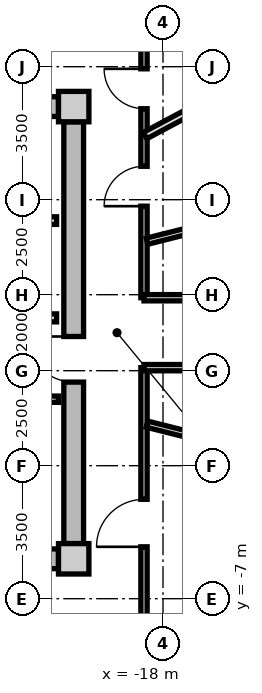
"""IFC4 building model, lengths in metres.
Left out: names, types, materials, properties, quantities, classifications, styles, units other than length and angle.
Written with IfcOpenShell. Run it as: python <this file> out.ifc"""

import sys

from ifc_helpers import new_model, si_unit, direction, frame, frame_2d, origin, origin_2d, place, context, subcontext, project, spatial, rectangle, extrude, source, transform, mapped, element, fill, save


model = new_model("IFC4")
c1 = context("Model", 3, precision=1e-05, world=origin(), true_north=direction((0.0, 1.0)))
c2 = subcontext(c1, "Body", "Model", "MODEL_VIEW")
j1 = project(units=[si_unit("LENGTHUNIT", "METRE"), si_unit("PLANEANGLEUNIT", "RADIAN")], contexts=[c1])
p1 = place(None, origin())
s1 = spatial("IfcSite", under=j1, at=p1, CompositionType="ELEMENT")
p2 = place(p1, origin())
s2 = spatial("IfcBuilding", under=s1, at=p2, CompositionType="ELEMENT")
p3 = place(p2, frame((0.0, 0.0, 220.0)))
s3 = spatial("IfcBuildingStorey", under=s2, at=p3, CompositionType="ELEMENT", Elevation=220.0)
m1 = source(origin(), c2, "Body", "SweptSolid", [
    extrude(rectangle(XDim=0.8, YDim=0.8, at=origin_2d()), origin(), (0.0, 0.0, 1.0), 3.05),
])
for number, where, z_axis, x_axis in (
    (1, (-20.35, -5.95, 0.0), (0.0, 0.0, 1.0), (1.0, 0.0, 0.0)),
    (2, (-20.35, 5.95, 0.0), (0.0, 0.0, 1.0), (1.0, 0.0, 0.0)),
):
    element("IfcColumn", number, at=place(p3, frame(where, z_axis=z_axis, x_axis=x_axis)), inside=s3, PredefinedType="COLUMN", context=c2, shape_type="MappedRepresentation", body=[
        mapped(m1, transform((0.0, 0.0, 0.0), x_axis=(1.0, 0.0, 0.0), y_axis=(0.0, 1.0, 0.0), z_axis=(0.0, 0.0, 1.0), scale=1.0)),
    ])
m2 = source(origin(), c2, "Body", "SweptSolid", [
    extrude(rectangle(XDim=14.5, YDim=0.52, at=frame_2d((7.25, 0.0))), origin(), (0.0, 0.0, 1.0), 2.76),
])
for number, where, z_axis, x_axis in (
    (3, (-35.25, 5.95, 0.0), (0.0, 0.0, 1.0), (1.0, 0.0, 0.0)),
    (4, (-20.75, -5.95, 0.0), (0.0, 0.0, 1.0), (-1.0, 0.0, 0.0)),
):
    element("IfcWall", number, at=place(p3, frame(where, z_axis=z_axis, x_axis=x_axis)), inside=s3, PredefinedType="SHEAR", context=c2, shape_type="MappedRepresentation", body=[
        mapped(m2, transform((0.0, 0.0, 0.0), x_axis=(1.0, 0.0, 0.0), y_axis=(0.0, 1.0, 0.0), z_axis=(0.0, 0.0, 1.0), scale=1.0)),
    ])
m3 = source(origin(), c2, "Body", "SweptSolid", [
    extrude(rectangle(XDim=11.1, YDim=0.52, at=frame_2d((5.55, 0.0))), origin(), (0.0, 0.0, 1.0), 2.76),
])
p4 = place(p3, frame((-20.35, 5.55, 0.0), z_axis=(0.0, 0.0, 1.0), x_axis=(0.0, -1.0, 0.0)))
e5 = element("IfcWall", 5, at=p4, inside=s3, PredefinedType="SHEAR", context=c2, shape_type="MappedRepresentation", body=[
    mapped(m3, transform((0.0, 0.0, 0.0), x_axis=(1.0, 0.0, 0.0), y_axis=(0.0, 1.0, 0.0), z_axis=(0.0, 0.0, 1.0), scale=1.0)),
])
p5 = place(p4, frame((5.65, 0.0, 0.0)))
e6 = element("IfcOpeningElement", 6, at=p5, cuts=e5, PredefinedType="OPENING", context=c2, shape_type="SweptSolid", body=[
    extrude(rectangle(XDim=1.2, YDim=2.15, at=frame_2d((0.6, 1.075))), frame((0.0, 0.27, 0.0), z_axis=(0.0, -1.0, 0.0), x_axis=(1.0, 0.0, 0.0)), (0.0, 0.0, 1.0), 0.54),
])
m4 = source(origin(), c2, "Body", "SweptSolid", [
    extrude(rectangle(XDim=3.2, YDim=0.2, at=frame_2d((1.6, 0.0))), origin(), (0.0, 0.0, 1.0), 2.745),
])
p6 = place(p3, frame((-24.0, 2.95, 0.0), z_axis=(0.0, 0.0, 1.0), x_axis=(1.0, 0.0, 0.0)))
e7 = element("IfcWall", 7, at=p6, inside=s3, PredefinedType="PARTITIONING", context=c2, shape_type="MappedRepresentation", body=[
    mapped(m4, transform((0.0, 0.0, 0.0), x_axis=(1.0, 0.0, 0.0), y_axis=(0.0, 1.0, 0.0), z_axis=(0.0, 0.0, 1.0), scale=1.0)),
])
m5 = source(origin(), c2, "Body", "SweptSolid", [
    extrude(rectangle(XDim=6.66, YDim=0.21, at=frame_2d((3.33, 0.0))), origin(), (0.0, 0.0, 1.0), 2.745),
])
p7 = place(p3, frame((-27.46, 0.39, 0.0), z_axis=(0.0, 0.0, 1.0), x_axis=(1.0, 0.0, 0.0)))
e8 = element("IfcWall", 8, at=p7, inside=s3, PredefinedType="PARTITIONING", context=c2, shape_type="MappedRepresentation", body=[
    mapped(m5, transform((0.0, 0.0, 0.0), x_axis=(1.0, 0.0, 0.0), y_axis=(0.0, 1.0, 0.0), z_axis=(0.0, 0.0, 1.0), scale=1.0)),
])
p8 = place(p7, frame((1.0, 0.0, 0.0)))
e9 = element("IfcOpeningElement", 9, at=p8, cuts=e8, PredefinedType="OPENING", context=c2, shape_type="SweptSolid", body=[
    extrude(rectangle(XDim=1.2, YDim=2.15, at=frame_2d((0.6, 1.075))), frame((0.0, 0.115, 0.0), z_axis=(0.0, -1.0, 0.0), x_axis=(1.0, 0.0, 0.0)), (0.0, 0.0, 1.0), 0.23),
])
m6 = source(origin(), c2, "Body", "SweptSolid", [
    extrude(rectangle(XDim=2.7, YDim=0.165, at=frame_2d((1.35, 0.0))), origin(), (0.0, 0.0, 1.0), 2.745),
])
p9 = place(p3, frame((-23.45, -1.75, 0.0), z_axis=(0.0, 0.0, 1.0), x_axis=(1.0, 0.0, 0.0)))
e10 = element("IfcWall", 10, at=p9, inside=s3, PredefinedType="PARTITIONING", context=c2, shape_type="MappedRepresentation", body=[
    mapped(m6, transform((0.0, 0.0, 0.0), x_axis=(1.0, 0.0, 0.0), y_axis=(0.0, 1.0, 0.0), z_axis=(0.0, 0.0, 1.0), scale=1.0)),
])
p10 = place(p9, frame((0.222, 0.0, 0.0)))
e11 = element("IfcOpeningElement", 11, at=p10, cuts=e10, PredefinedType="OPENING", context=c2, shape_type="SweptSolid", body=[
    extrude(rectangle(XDim=0.925, YDim=2.1, at=frame_2d((0.462, 1.05))), frame((0.0, 0.093, 0.0), z_axis=(0.0, -1.0, 0.0), x_axis=(1.0, 0.0, 0.0)), (0.0, 0.0, 1.0), 0.185),
])
p11 = place(p9, frame((1.522, 0.0, 0.0)))
e12 = element("IfcOpeningElement", 12, at=p11, cuts=e10, PredefinedType="OPENING", context=c2, shape_type="SweptSolid", body=[
    extrude(rectangle(XDim=0.925, YDim=2.1, at=frame_2d((0.462, 1.05))), frame((0.0, 0.093, 0.0), z_axis=(0.0, -1.0, 0.0), x_axis=(1.0, 0.0, 0.0)), (0.0, 0.0, 1.0), 0.185),
])
m7 = source(origin(), c2, "Body", "SweptSolid", [
    extrude(rectangle(XDim=6.88, YDim=0.165, at=frame_2d((3.44, 0.0))), origin(), (0.0, 0.0, 1.0), 2.745),
])
p12 = place(p3, frame((-18.5, 7.8, 0.0), z_axis=(0.0, 0.0, 1.0), x_axis=(0.0, -1.0, 0.0)))
e13 = element("IfcWall", 13, at=p12, inside=s3, PredefinedType="PARTITIONING", context=c2, shape_type="MappedRepresentation", body=[
    mapped(m7, transform((0.0, 0.0, 0.0), x_axis=(1.0, 0.0, 0.0), y_axis=(0.0, 1.0, 0.0), z_axis=(0.0, 0.0, 1.0), scale=1.0)),
])
p13 = place(p12, frame((3.421, 0.0, 0.0)))
e14 = element("IfcOpeningElement", 14, at=p13, cuts=e13, PredefinedType="OPENING", context=c2, shape_type="SweptSolid", body=[
    extrude(rectangle(XDim=1.05, YDim=2.15, at=frame_2d((0.525, 1.075))), frame((0.0, 0.093, 0.0), z_axis=(0.0, -1.0, 0.0), x_axis=(1.0, 0.0, 0.0)), (0.0, 0.0, 1.0), 0.185),
])
p14 = place(p12, frame((0.856, 0.0, 0.0)))
e15 = element("IfcOpeningElement", 15, at=p14, cuts=e13, PredefinedType="OPENING", context=c2, shape_type="SweptSolid", body=[
    extrude(rectangle(XDim=1.05, YDim=2.15, at=frame_2d((0.525, 1.075))), frame((0.0, 0.093, 0.0), z_axis=(0.0, -1.0, 0.0), x_axis=(1.0, 0.0, 0.0)), (0.0, 0.0, 1.0), 0.185),
])
p15 = place(p3, frame((-18.5, -0.92, 0.0), z_axis=(0.0, 0.0, 1.0), x_axis=(0.0, -1.0, 0.0)))
e16 = element("IfcWall", 16, at=p15, inside=s3, PredefinedType="PARTITIONING", context=c2, shape_type="MappedRepresentation", body=[
    mapped(m7, transform((0.0, 0.0, 0.0), x_axis=(1.0, 0.0, 0.0), y_axis=(0.0, 1.0, 0.0), z_axis=(0.0, 0.0, 1.0), scale=1.0)),
])
p16 = place(p15, frame((3.464, 0.0, 0.0)))
e17 = element("IfcOpeningElement", 17, at=p16, cuts=e16, PredefinedType="OPENING", context=c2, shape_type="SweptSolid", body=[
    extrude(rectangle(XDim=1.25, YDim=2.2, at=frame_2d((0.625, 1.1))), frame((0.0, 0.093, 0.0), z_axis=(0.0, -1.0, 0.0), x_axis=(1.0, 0.0, 0.0)), (0.0, 0.0, 1.0), 0.185),
])
m8 = source(origin(), c2, "Body", "SweptSolid", [
    extrude(rectangle(XDim=6.157, YDim=0.165, at=frame_2d((3.079, 0.0))), origin(), (0.0, 0.0, 1.0), 2.345),
])
for number, where, z_axis, x_axis in (
    (18, (-18.42, -2.407, 0.0), (0.0, 0.0, 1.0), (0.97, -0.244, 0.0)),
    (19, (-18.42, 2.407, 0.0), (0.0, 0.0, 1.0), (0.97, 0.244, 0.0)),
):
    element("IfcWall", number, at=place(p3, frame(where, z_axis=z_axis, x_axis=x_axis)), inside=s3, PredefinedType="PARTITIONING", context=c2, shape_type="MappedRepresentation", body=[
        mapped(m8, transform((0.0, 0.0, 0.0), x_axis=(1.0, 0.0, 0.0), y_axis=(0.0, 1.0, 0.0), z_axis=(0.0, 0.0, 1.0), scale=1.0)),
    ])
m9 = source(origin(), c2, "Body", "SweptSolid", [
    extrude(rectangle(XDim=4.465, YDim=0.19, at=frame_2d((2.232, 0.0))), origin(), (0.0, 0.0, 1.0), 2.745),
])
p17 = place(p3, frame((-18.47, 5.188, 0.0), z_axis=(0.0, 0.0, 1.0), x_axis=(0.881981829834, 0.471283409259, 0.0)))
e20 = element("IfcWall", 20, at=p17, inside=s3, PredefinedType="PARTITIONING", context=c2, shape_type="MappedRepresentation", body=[
    mapped(m9, transform((0.0, 0.0, 0.0), x_axis=(1.0, 0.0, 0.0), y_axis=(0.0, 1.0, 0.0), z_axis=(0.0, 0.0, 1.0), scale=1.0)),
])
m10 = source(origin(), c2, "Body", "SweptSolid", [
    extrude(rectangle(XDim=37.0, YDim=0.165, at=frame_2d((18.5, 0.0))), origin(), (0.0, 0.0, 1.0), 2.745),
])
p18 = place(p3, frame((-18.5, -0.92, 0.0), z_axis=(0.0, 0.0, 1.0), x_axis=(1.0, 0.0, 0.0)))
e21 = element("IfcWall", 21, at=p18, inside=s3, PredefinedType="PARTITIONING", context=c2, shape_type="MappedRepresentation", body=[
    mapped(m10, transform((0.0, 0.0, 0.0), x_axis=(1.0, 0.0, 0.0), y_axis=(0.0, 1.0, 0.0), z_axis=(0.0, 0.0, 1.0), scale=1.0)),
])
p19 = place(p18, frame((2.662, 0.0, 0.0)))
e22 = element("IfcOpeningElement", 22, at=p19, cuts=e21, PredefinedType="OPENING", context=c2, shape_type="SweptSolid", body=[
    extrude(rectangle(XDim=0.95, YDim=2.1, at=frame_2d((0.475, 1.05))), frame((0.0, 0.093, 0.0), z_axis=(0.0, -1.0, 0.0), x_axis=(1.0, 0.0, 0.0)), (0.0, 0.0, 1.0), 0.185),
])
p20 = place(p18, frame((33.388, 0.0, 0.0)))
e23 = element("IfcOpeningElement", 23, at=p20, cuts=e21, PredefinedType="OPENING", context=c2, shape_type="SweptSolid", body=[
    extrude(rectangle(XDim=0.95, YDim=2.1, at=frame_2d((0.475, 1.05))), frame((0.0, 0.093, 0.0), z_axis=(0.0, -1.0, 0.0), x_axis=(1.0, 0.0, 0.0)), (0.0, 0.0, 1.0), 0.185),
])
p21 = place(p18, frame((9.075, 0.0, 0.0)))
e24 = element("IfcOpeningElement", 24, at=p21, cuts=e21, PredefinedType="OPENING", context=c2, shape_type="SweptSolid", body=[
    extrude(rectangle(XDim=1.25, YDim=2.2, at=frame_2d((0.625, 1.1))), frame((0.0, 0.093, 0.0), z_axis=(0.0, -1.0, 0.0), x_axis=(1.0, 0.0, 0.0)), (0.0, 0.0, 1.0), 0.185),
])
p22 = place(p18, frame((14.875, 0.0, 0.0)))
e25 = element("IfcOpeningElement", 25, at=p22, cuts=e21, PredefinedType="OPENING", context=c2, shape_type="SweptSolid", body=[
    extrude(rectangle(XDim=1.25, YDim=2.2, at=frame_2d((0.625, 1.1))), frame((0.0, 0.093, 0.0), z_axis=(0.0, -1.0, 0.0), x_axis=(1.0, 0.0, 0.0)), (0.0, 0.0, 1.0), 0.185),
])
p23 = place(p18, frame((23.03, 0.0, 0.0)))
e26 = element("IfcOpeningElement", 26, at=p23, cuts=e21, PredefinedType="OPENING", context=c2, shape_type="SweptSolid", body=[
    extrude(rectangle(XDim=1.25, YDim=2.2, at=frame_2d((0.625, 1.1))), frame((0.0, 0.093, 0.0), z_axis=(0.0, -1.0, 0.0), x_axis=(1.0, 0.0, 0.0)), (0.0, 0.0, 1.0), 0.185),
])
p24 = place(p3, frame((-18.5, 0.92, 0.0), z_axis=(0.0, 0.0, 1.0), x_axis=(1.0, 0.0, 0.0)))
e27 = element("IfcWall", 27, at=p24, inside=s3, PredefinedType="PARTITIONING", context=c2, shape_type="MappedRepresentation", body=[
    mapped(m10, transform((0.0, 0.0, 0.0), x_axis=(1.0, 0.0, 0.0), y_axis=(0.0, 1.0, 0.0), z_axis=(0.0, 0.0, 1.0), scale=1.0)),
])
p25 = place(p24, frame((2.662, 0.0, 0.0)))
e28 = element("IfcOpeningElement", 28, at=p25, cuts=e27, PredefinedType="OPENING", context=c2, shape_type="SweptSolid", body=[
    extrude(rectangle(XDim=0.95, YDim=2.1, at=frame_2d((0.475, 1.05))), frame((0.0, 0.093, 0.0), z_axis=(0.0, -1.0, 0.0), x_axis=(1.0, 0.0, 0.0)), (0.0, 0.0, 1.0), 0.185),
])
p26 = place(p24, frame((33.388, 0.0, 0.0)))
e29 = element("IfcOpeningElement", 29, at=p26, cuts=e27, PredefinedType="OPENING", context=c2, shape_type="SweptSolid", body=[
    extrude(rectangle(XDim=0.95, YDim=2.1, at=frame_2d((0.475, 1.05))), frame((0.0, 0.093, 0.0), z_axis=(0.0, -1.0, 0.0), x_axis=(1.0, 0.0, 0.0)), (0.0, 0.0, 1.0), 0.185),
])
p27 = place(p24, frame((7.64, 0.0, 0.0)))
e30 = element("IfcOpeningElement", 30, at=p27, cuts=e27, PredefinedType="OPENING", context=c2, shape_type="SweptSolid", body=[
    extrude(rectangle(XDim=0.92, YDim=2.1, at=frame_2d((0.46, 1.05))), frame((0.0, 0.093, 0.0), z_axis=(0.0, -1.0, 0.0), x_axis=(1.0, 0.0, 0.0)), (0.0, 0.0, 1.0), 0.185),
])
p28 = place(p24, frame((10.275, 0.0, 0.0)))
e31 = element("IfcOpeningElement", 31, at=p28, cuts=e27, PredefinedType="OPENING", context=c2, shape_type="SweptSolid", body=[
    extrude(rectangle(XDim=1.25, YDim=2.2, at=frame_2d((0.625, 1.1))), frame((0.0, 0.093, 0.0), z_axis=(0.0, -1.0, 0.0), x_axis=(1.0, 0.0, 0.0)), (0.0, 0.0, 1.0), 0.185),
])
p29 = place(p24, frame((14.875, 0.0, 0.0)))
e32 = element("IfcOpeningElement", 32, at=p29, cuts=e27, PredefinedType="OPENING", context=c2, shape_type="SweptSolid", body=[
    extrude(rectangle(XDim=1.25, YDim=2.2, at=frame_2d((0.625, 1.1))), frame((0.0, 0.093, 0.0), z_axis=(0.0, -1.0, 0.0), x_axis=(1.0, 0.0, 0.0)), (0.0, 0.0, 1.0), 0.185),
])
p30 = place(p24, frame((23.03, 0.0, 0.0)))
e33 = element("IfcOpeningElement", 33, at=p30, cuts=e27, PredefinedType="OPENING", context=c2, shape_type="SweptSolid", body=[
    extrude(rectangle(XDim=1.25, YDim=2.2, at=frame_2d((0.625, 1.1))), frame((0.0, 0.093, 0.0), z_axis=(0.0, -1.0, 0.0), x_axis=(1.0, 0.0, 0.0)), (0.0, 0.0, 1.0), 0.185),
])
m11 = source(origin(), c2, "Body", "SweptSolid", [
    extrude(rectangle(XDim=1.2, YDim=2.15, at=frame_2d((0.6, 1.075))), frame((0.0, 0.025, 0.0), z_axis=(0.0, -1.0, 0.0), x_axis=(1.0, 0.0, 0.0)), (0.0, 0.0, 1.0), 0.05),
])
p31 = place(p5, frame((1.2, 0.0, 0.0), z_axis=(0.0, 0.0, 1.0), x_axis=(-1.0, 0.0, 0.0)))
e34 = element("IfcDoor", 34, at=p31, inside=s3, OperationType="SINGLE_SWING_RIGHT", PredefinedType="DOOR", context=c2, shape_type="MappedRepresentation", body=[
    mapped(m11, transform((0.0, 0.0, 0.0), x_axis=(1.0, 0.0, 0.0), y_axis=(0.0, 1.0, 0.0), z_axis=(0.0, 0.0, 1.0), scale=1.0)),
])
fill(e6, e34)
m12 = source(origin(), c2, "Body", "SweptSolid", [
    extrude(rectangle(XDim=1.05, YDim=2.15, at=frame_2d((0.525, 1.075))), frame((0.0, 0.025, 0.0), z_axis=(0.0, -1.0, 0.0), x_axis=(1.0, 0.0, 0.0)), (0.0, 0.0, 1.0), 0.05),
])
p32 = place(p13, frame((1.05, 0.0, 0.0), z_axis=(0.0, 0.0, 1.0), x_axis=(-1.0, 0.0, 0.0)))
e35 = element("IfcDoor", 35, at=p32, inside=s3, OperationType="SINGLE_SWING_LEFT", PredefinedType="DOOR", context=c2, shape_type="MappedRepresentation", body=[
    mapped(m12, transform((0.0, 0.0, 0.0), x_axis=(1.0, 0.0, 0.0), y_axis=(0.0, 1.0, 0.0), z_axis=(0.0, 0.0, 1.0), scale=1.0)),
])
fill(e14, e35)
p33 = place(p14, frame((1.05, 0.0, 0.0), z_axis=(0.0, 0.0, 1.0), x_axis=(-1.0, 0.0, 0.0)))
e36 = element("IfcDoor", 36, at=p33, inside=s3, OperationType="SINGLE_SWING_RIGHT", PredefinedType="DOOR", context=c2, shape_type="MappedRepresentation", body=[
    mapped(m12, transform((0.0, 0.0, 0.0), x_axis=(1.0, 0.0, 0.0), y_axis=(0.0, 1.0, 0.0), z_axis=(0.0, 0.0, 1.0), scale=1.0)),
])
fill(e15, e36)
m13 = source(origin(), c2, "Body", "SweptSolid", [
    extrude(rectangle(XDim=1.25, YDim=2.2, at=frame_2d((0.625, 1.1))), frame((0.0, 0.025, 0.0), z_axis=(0.0, -1.0, 0.0), x_axis=(1.0, 0.0, 0.0)), (0.0, 0.0, 1.0), 0.05),
])
p34 = place(p16, frame((1.25, 0.0, 0.0), z_axis=(0.0, 0.0, 1.0), x_axis=(-1.0, 0.0, 0.0)))
e37 = element("IfcDoor", 37, at=p34, inside=s3, OperationType="SINGLE_SWING_LEFT", PredefinedType="DOOR", context=c2, shape_type="MappedRepresentation", body=[
    mapped(m13, transform((0.0, 0.0, 0.0), x_axis=(1.0, 0.0, 0.0), y_axis=(0.0, 1.0, 0.0), z_axis=(0.0, 0.0, 1.0), scale=1.0)),
])
fill(e17, e37)
save(model, sys.argv[1])
